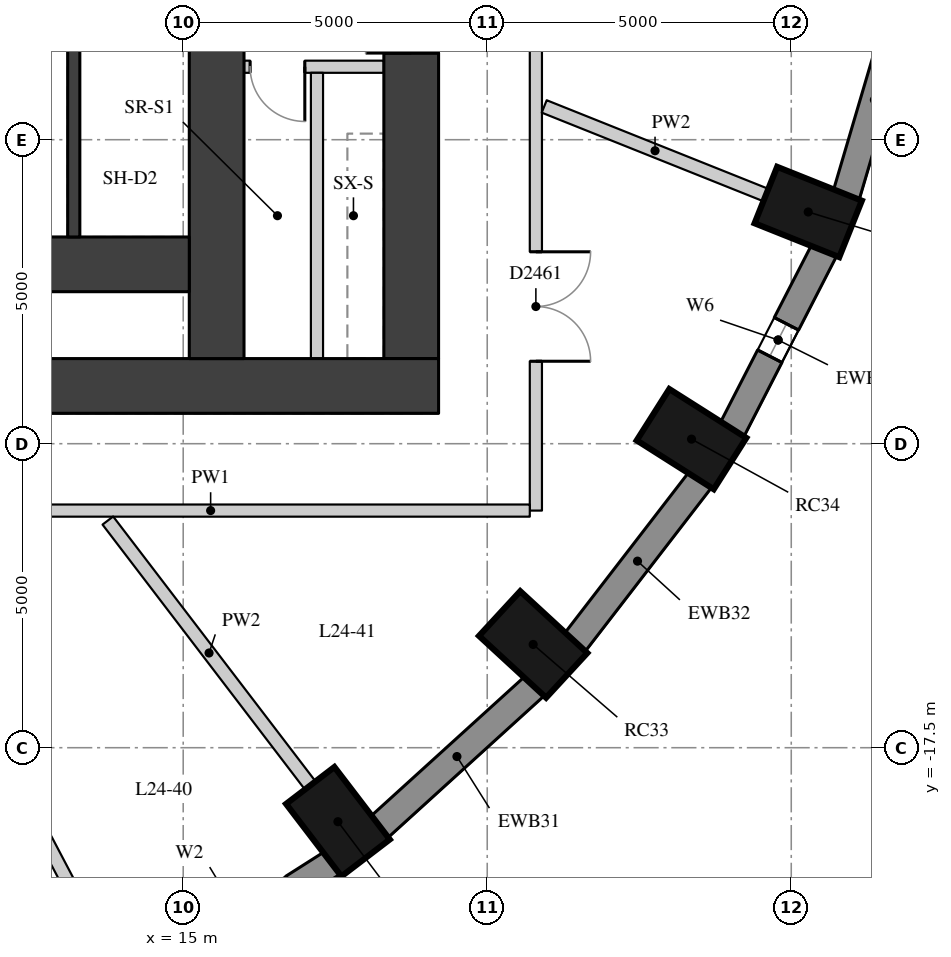
"""IFC4 building model, lengths in metres.
Left out: names, types, materials, properties, quantities, classifications, styles, units other than length and angle.
Written with IfcOpenShell. Run it as: python <this file> out.ifc"""

import sys

from ifc_helpers import new_model, si_unit, direction, frame, frame_2d, origin, origin_2d, place, context, subcontext, project, spatial, rectangle, extrude, element, fill, save


model = new_model("IFC4")
c1 = context("Model", 3, precision=1e-05, world=origin(), true_north=direction((0.0, 1.0)))
c2 = subcontext(c1, "Body", "Model", "MODEL_VIEW")
j1 = project(units=[si_unit("LENGTHUNIT", "METRE"), si_unit("PLANEANGLEUNIT", "RADIAN")], contexts=[c1])
p1 = place(None, origin())
s1 = spatial("IfcSite", under=j1, at=p1, CompositionType="ELEMENT")
p2 = place(p1, origin())
s2 = spatial("IfcBuilding", under=s1, at=p2, CompositionType="ELEMENT")
p3 = place(p2, frame((0.0, 0.0, 88.9)))
s3 = spatial("IfcBuildingStorey", under=s2, at=p3, CompositionType="ELEMENT", Elevation=88.9)
for number, where, z_axis, x_axis in (
    (1, (17.545, -18.717, 0.0), (0.0, 0.0, 1.0), (0.607, -0.795, 0.0)),
    (2, (20.755, -15.802, 0.0), (0.0, 0.0, 1.0), (0.735, -0.678, 0.0)),
    (3, (23.36, -12.425, 0.0), (0.0, 0.0, 1.0), (0.845, -0.536, 0.0)),
    (4, (25.279, -8.689, 0.0), (0.0, 0.0, 1.0), (0.929, -0.371, 0.0)),
):
    element("IfcColumn", number, at=place(p3, frame(where, z_axis=z_axis, x_axis=x_axis)), inside=s3, PredefinedType="COLUMN", context=c2, shape_type="SweptSolid", body=[
        extrude(rectangle(XDim=1.5, YDim=1.0, at=origin_2d()), origin(), (0.0, 0.0, 1.0), 3.3),
    ])
p4 = place(p3, frame((14.475, -21.287, 0.0), z_axis=(0.0, 0.0, 1.0), x_axis=(0.843911841423, 0.536481876587, 0.0)))
e5 = element("IfcWall", 5, at=p4, inside=s3, PredefinedType="SOLIDWALL", context=c2, shape_type="SweptSolid", body=[
    extrude(rectangle(XDim=3.532, YDim=0.45, at=frame_2d((1.766, 0.0))), origin(), (0.0, 0.0, 1.0), 3.02),
])
p5 = place(p4, frame((0.766, 0.0, 0.4)))
e6 = element("IfcOpeningElement", 6, at=p5, cuts=e5, PredefinedType="OPENING", context=c2, shape_type="SweptSolid", body=[
    extrude(rectangle(XDim=2.0, YDim=1.75, at=frame_2d((1.0, 0.875))), frame((0.0, 0.235, 0.0), z_axis=(0.0, -1.0, 0.0), x_axis=(1.0, 0.0, 0.0)), (0.0, 0.0, 1.0), 0.47),
])
p6 = place(p3, frame((18.219, -18.81, 0.0), z_axis=(0.0, 0.0, 1.0), x_axis=(0.740364106106, 0.672206062446, 0.0)))
e7 = element("IfcWall", 7, at=p6, inside=s3, PredefinedType="SOLIDWALL", context=c2, shape_type="SweptSolid", body=[
    extrude(rectangle(XDim=3.464, YDim=0.45, at=frame_2d((1.732, 0.0))), origin(), (0.0, 0.0, 1.0), 3.02),
])
p7 = place(p3, frame((21.435, -15.775, 0.0), z_axis=(0.0, 0.0, 1.0), x_axis=(0.610693945156, 0.791866721961, 0.0)))
e8 = element("IfcWall", 8, at=p7, inside=s3, PredefinedType="SOLIDWALL", context=c2, shape_type="SweptSolid", body=[
    extrude(rectangle(XDim=3.395, YDim=0.45, at=frame_2d((1.697, 0.0))), origin(), (0.0, 0.0, 1.0), 3.02),
])
p8 = place(p3, frame((24.023, -12.277, 0.0), z_axis=(0.0, 0.0, 1.0), x_axis=(0.456828186229, 0.889554949549, 0.0)))
e9 = element("IfcWall", 9, at=p8, inside=s3, PredefinedType="SOLIDWALL", context=c2, shape_type="SweptSolid", body=[
    extrude(rectangle(XDim=3.333, YDim=0.45, at=frame_2d((1.667, 0.0))), origin(), (0.0, 0.0, 1.0), 3.02),
])
p9 = place(p8, frame((1.366, 0.0, 0.4)))
e10 = element("IfcOpeningElement", 10, at=p9, cuts=e9, PredefinedType="OPENING", context=c2, shape_type="SweptSolid", body=[
    extrude(rectangle(XDim=0.6, YDim=1.75, at=frame_2d((0.3, 0.875))), frame((0.0, 0.235, 0.0), z_axis=(0.0, -1.0, 0.0), x_axis=(1.0, 0.0, 0.0)), (0.0, 0.0, 1.0), 0.47),
])
p10 = place(p3, frame((25.902, -8.421, 0.0), z_axis=(0.0, 0.0, 1.0), x_axis=(0.282982737009, 0.95912500257, 0.0)))
e11 = element("IfcWall", 11, at=p10, inside=s3, PredefinedType="SOLIDWALL", context=c2, shape_type="SweptSolid", body=[
    extrude(rectangle(XDim=3.286, YDim=0.45, at=frame_2d((1.643, 0.0))), origin(), (0.0, 0.0, 1.0), 3.02),
])
p11 = place(p3, frame((18.75, -11.1, 0.0), z_axis=(0.0, 0.0, 1.0), x_axis=(0.0, 1.0, 0.0)))
e12 = element("IfcWall", 12, at=p11, inside=s3, PredefinedType="SHEAR", context=c2, shape_type="SweptSolid", body=[
    extrude(rectangle(XDim=22.2, YDim=0.9, at=frame_2d((11.1, 0.0))), origin(), (0.0, 0.0, 1.0), 3.02),
])
p12 = place(p11, frame((16.175, 0.0, 0.0)))
e13 = element("IfcOpeningElement", 13, at=p12, cuts=e12, PredefinedType="OPENING", context=c2, shape_type="SweptSolid", body=[
    extrude(rectangle(XDim=1.5, YDim=2.1, at=frame_2d((0.75, 1.05))), frame((0.0, 0.46, 0.0), z_axis=(0.0, -1.0, 0.0), x_axis=(1.0, 0.0, 0.0)), (0.0, 0.0, 1.0), 0.92),
])
p13 = place(p11, frame((5.025, 0.0, 0.0)))
e14 = element("IfcOpeningElement", 14, at=p13, cuts=e12, PredefinedType="OPENING", context=c2, shape_type="SweptSolid", body=[
    extrude(rectangle(XDim=1.5, YDim=2.1, at=frame_2d((0.75, 1.05))), frame((0.0, 0.46, 0.0), z_axis=(0.0, -1.0, 0.0), x_axis=(1.0, 0.0, 0.0)), (0.0, 0.0, 1.0), 0.92),
])
p14 = place(p3, frame((4.0, -11.55, 0.0), z_axis=(0.0, 0.0, 1.0), x_axis=(1.0, 0.0, 0.0)))
e15 = element("IfcWall", 15, at=p14, inside=s3, PredefinedType="SHEAR", context=c2, shape_type="SweptSolid", body=[
    extrude(rectangle(XDim=15.2, YDim=0.9, at=frame_2d((7.6, 0.0))), origin(), (0.0, 0.0, 1.0), 3.02),
])
p15 = place(p3, frame((15.55, -11.1, 0.0), z_axis=(0.0, 0.0, 1.0), x_axis=(0.0, 1.0, 0.0)))
e16 = element("IfcWall", 16, at=p15, inside=s3, PredefinedType="SHEAR", context=c2, shape_type="SweptSolid", body=[
    extrude(rectangle(XDim=22.2, YDim=0.9, at=frame_2d((11.1, 0.0))), origin(), (0.0, 0.0, 1.0), 3.02),
])
p16 = place(p15, frame((15.6, 0.0, 0.0)))
e17 = element("IfcOpeningElement", 17, at=p16, cuts=e16, PredefinedType="OPENING", context=c2, shape_type="SweptSolid", body=[
    extrude(rectangle(XDim=1.0, YDim=2.1, at=frame_2d((0.5, 1.05))), frame((0.0, 0.46, 0.0), z_axis=(0.0, -1.0, 0.0), x_axis=(1.0, 0.0, 0.0)), (0.0, 0.0, 1.0), 0.92),
])
p17 = place(p15, frame((5.6, 0.0, 0.0)))
e18 = element("IfcOpeningElement", 18, at=p17, cuts=e16, PredefinedType="OPENING", context=c2, shape_type="SweptSolid", body=[
    extrude(rectangle(XDim=1.0, YDim=2.1, at=frame_2d((0.5, 1.05))), frame((0.0, 0.46, 0.0), z_axis=(0.0, -1.0, 0.0), x_axis=(1.0, 0.0, 0.0)), (0.0, 0.0, 1.0), 0.92),
])
p18 = place(p3, frame((4.9, -9.55, 0.0), z_axis=(0.0, 0.0, 1.0), x_axis=(1.0, 0.0, 0.0)))
e19 = element("IfcWall", 19, at=p18, inside=s3, PredefinedType="SHEAR", context=c2, shape_type="SweptSolid", body=[
    extrude(rectangle(XDim=10.2, YDim=0.9, at=frame_2d((5.1, 0.0))), origin(), (0.0, 0.0, 1.0), 3.02),
])
p19 = place(p3, frame((13.2, -9.1, 0.0), z_axis=(0.0, 0.0, 1.0), x_axis=(0.0, 1.0, 0.0)))
e20 = element("IfcWall", 20, at=p19, inside=s3, PredefinedType="SHEAR", context=c2, shape_type="SweptSolid", body=[
    extrude(rectangle(XDim=3.2, YDim=0.2, at=frame_2d((1.6, 0.0))), origin(), (0.0, 0.0, 1.0), 3.02),
])
p20 = place(p3, frame((16.0, -6.3, 0.0), z_axis=(0.0, 0.0, 1.0), x_axis=(1.0, 0.0, 0.0)))
e21 = element("IfcWall", 21, at=p20, inside=s3, PredefinedType="PARTITIONING", context=c2, shape_type="SweptSolid", body=[
    extrude(rectangle(XDim=2.3, YDim=0.2, at=frame_2d((1.15, 0.0))), origin(), (0.0, 0.0, 1.0), 3.02),
])
p21 = place(p20, frame((0.1, 0.0, 0.0)))
e22 = element("IfcOpeningElement", 22, at=p21, cuts=e21, PredefinedType="OPENING", context=c2, shape_type="SweptSolid", body=[
    extrude(rectangle(XDim=0.9, YDim=2.1, at=frame_2d((0.45, 1.05))), frame((0.0, 0.11, 0.0), z_axis=(0.0, -1.0, 0.0), x_axis=(1.0, 0.0, 0.0)), (0.0, 0.0, 1.0), 0.22),
])
p22 = place(p3, frame((17.2, -11.1, 0.0), z_axis=(0.0, 0.0, 1.0), x_axis=(0.0, 1.0, 0.0)))
e23 = element("IfcWall", 23, at=p22, inside=s3, PredefinedType="PARTITIONING", context=c2, shape_type="SweptSolid", body=[
    extrude(rectangle(XDim=4.7, YDim=0.2, at=frame_2d((2.35, 0.0))), origin(), (0.0, 0.0, 1.0), 3.02),
])
p23 = place(p3, frame((20.8, 13.5, 0.0), z_axis=(0.0, 0.0, 1.0), x_axis=(0.0, -1.0, 0.0)))
e24 = element("IfcWall", 24, at=p23, inside=s3, PredefinedType="PARTITIONING", context=c2, shape_type="SweptSolid", body=[
    extrude(rectangle(XDim=27.1, YDim=0.2, at=frame_2d((13.55, 0.0))), origin(), (0.0, 0.0, 1.0), 3.02),
])
p24 = place(p23, frame((22.844, 0.0, 0.0)))
e25 = element("IfcOpeningElement", 25, at=p24, cuts=e24, PredefinedType="OPENING", context=c2, shape_type="SweptSolid", body=[
    extrude(rectangle(XDim=1.8, YDim=2.1, at=frame_2d((0.9, 1.05))), frame((0.0, 0.11, 0.0), z_axis=(0.0, -1.0, 0.0), x_axis=(1.0, 0.0, 0.0)), (0.0, 0.0, 1.0), 0.22),
])
p25 = place(p23, frame((16.35, 0.0, 0.0)))
e26 = element("IfcOpeningElement", 26, at=p25, cuts=e24, PredefinedType="OPENING", context=c2, shape_type="SweptSolid", body=[
    extrude(rectangle(XDim=1.8, YDim=2.1, at=frame_2d((0.9, 1.05))), frame((0.0, 0.11, 0.0), z_axis=(0.0, -1.0, 0.0), x_axis=(1.0, 0.0, 0.0)), (0.0, 0.0, 1.0), 0.22),
])
p26 = place(p23, frame((7.996, 0.0, 0.0)))
e27 = element("IfcOpeningElement", 27, at=p26, cuts=e24, PredefinedType="OPENING", context=c2, shape_type="SweptSolid", body=[
    extrude(rectangle(XDim=1.8, YDim=2.1, at=frame_2d((0.9, 1.05))), frame((0.0, 0.11, 0.0), z_axis=(0.0, -1.0, 0.0), x_axis=(1.0, 0.0, 0.0)), (0.0, 0.0, 1.0), 0.22),
])
p27 = place(p3, frame((20.7, -13.6, 0.0), z_axis=(0.0, 0.0, 1.0), x_axis=(-1.0, 0.0, 0.0)))
e28 = element("IfcWall", 28, at=p27, inside=s3, PredefinedType="PARTITIONING", context=c2, shape_type="SweptSolid", body=[
    extrude(rectangle(XDim=10.498, YDim=0.2, at=frame_2d((5.249, 0.0))), origin(), (0.0, 0.0, 1.0), 3.02),
])
p28 = place(p27, frame((8.325, 0.0, 0.0)))
e29 = element("IfcOpeningElement", 29, at=p28, cuts=e28, PredefinedType="OPENING", context=c2, shape_type="SweptSolid", body=[
    extrude(rectangle(XDim=0.9, YDim=2.1, at=frame_2d((0.45, 1.05))), frame((0.0, 0.11, 0.0), z_axis=(0.0, -1.0, 0.0), x_axis=(1.0, 0.0, 0.0)), (0.0, 0.0, 1.0), 0.22),
])
p29 = place(p3, frame((13.476, -20.418, 0.0), z_axis=(0.0, 0.0, 1.0), x_axis=(-0.465295750937, 0.885155276864, 0.0)))
e30 = element("IfcWall", 30, at=p29, inside=s3, PredefinedType="PARTITIONING", context=c2, shape_type="SweptSolid", body=[
    extrude(rectangle(XDim=7.458, YDim=0.22, at=frame_2d((3.729, 0.0))), origin(), (0.0, 0.0, 1.0), 3.02),
])
p30 = place(p3, frame((17.089, -18.121, 0.0), z_axis=(0.0, 0.0, 1.0), x_axis=(-0.607064955951, 0.794652212767, 0.0)))
e31 = element("IfcWall", 31, at=p30, inside=s3, PredefinedType="PARTITIONING", context=c2, shape_type="SweptSolid", body=[
    extrude(rectangle(XDim=5.483, YDim=0.22, at=frame_2d((2.742, 0.0))), origin(), (0.0, 0.0, 1.0), 3.02),
])
p31 = place(p3, frame((24.583, -8.41, 0.0), z_axis=(0.0, 0.0, 1.0), x_axis=(-0.928528147853, 0.371262008083, 0.0)))
e32 = element("IfcWall", 32, at=p31, inside=s3, PredefinedType="PARTITIONING", context=c2, shape_type="SweptSolid", body=[
    extrude(rectangle(XDim=3.926, YDim=0.22, at=frame_2d((1.963, 0.0))), origin(), (0.0, 0.0, 1.0), 3.02),
])
p32 = place(p9, origin())
e33 = element("IfcWindow", 33, at=p32, inside=s3, PartitioningType="SINGLE_PANEL", PredefinedType="WINDOW", context=c2, shape_type="SweptSolid", body=[
    extrude(rectangle(XDim=0.6, YDim=1.75, at=frame_2d((0.3, 0.875))), frame((0.0, 0.035, 0.0), z_axis=(0.0, -1.0, 0.0), x_axis=(1.0, 0.0, 0.0)), (0.0, 0.0, 1.0), 0.06),
])
fill(e10, e33)
p33 = place(p13, origin())
e34 = element("IfcDoor", 34, at=p33, inside=s3, OperationType="DOUBLE_DOOR_SINGLE_SWING", PredefinedType="DOOR", context=c2, shape_type="SweptSolid", body=[
    extrude(rectangle(XDim=1.5, YDim=2.1, at=frame_2d((0.75, 1.05))), frame((0.0, 0.025, 0.0), z_axis=(0.0, -1.0, 0.0), x_axis=(1.0, 0.0, 0.0)), (0.0, 0.0, 1.0), 0.05),
])
fill(e14, e34)
p34 = place(p21, origin())
e35 = element("IfcDoor", 35, at=p34, inside=s3, OperationType="SINGLE_SWING_LEFT", PredefinedType="DOOR", context=c2, shape_type="SweptSolid", body=[
    extrude(rectangle(XDim=0.9, YDim=2.1, at=frame_2d((0.45, 1.05))), frame((0.0, 0.025, 0.0), z_axis=(0.0, -1.0, 0.0), x_axis=(1.0, 0.0, 0.0)), (0.0, 0.0, 1.0), 0.05),
])
fill(e22, e35)
p35 = place(p24, origin())
e36 = element("IfcDoor", 36, at=p35, inside=s3, OperationType="DOUBLE_DOOR_SINGLE_SWING", PredefinedType="DOOR", context=c2, shape_type="SweptSolid", body=[
    extrude(rectangle(XDim=1.8, YDim=2.1, at=frame_2d((0.9, 1.05))), frame((0.0, 0.025, 0.0), z_axis=(0.0, -1.0, 0.0), x_axis=(1.0, 0.0, 0.0)), (0.0, 0.0, 1.0), 0.05),
])
fill(e25, e36)
save(model, sys.argv[1])
